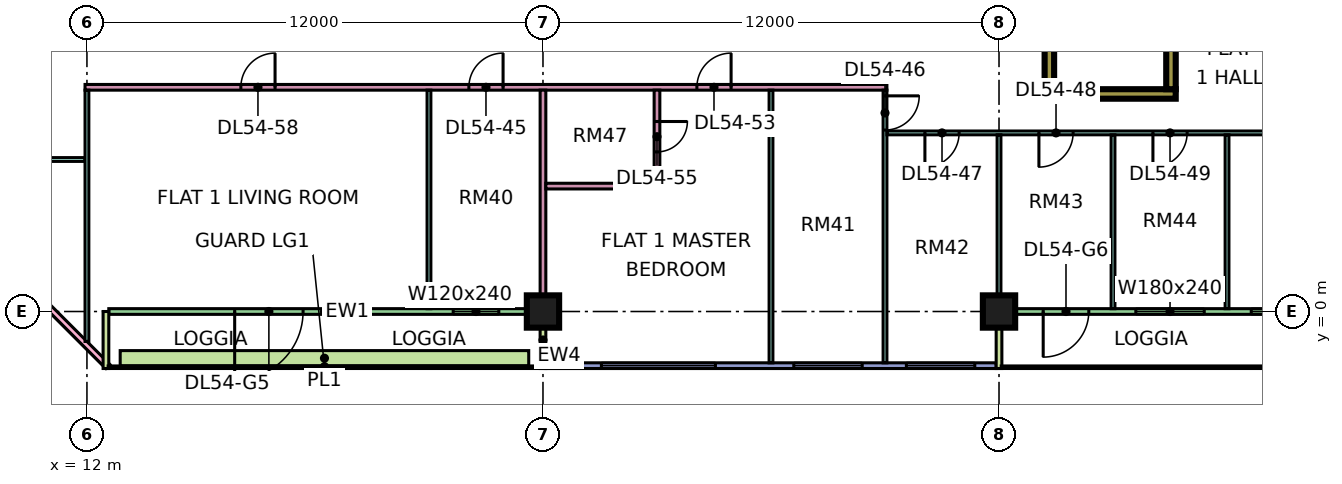
"""IFC4 building model, lengths in metres.
Left out: names, types, materials, properties, quantities, classifications, styles, units other than length and angle.
Written with IfcOpenShell. Run it as: python <this file> out.ifc"""

import sys

from ifc_helpers import new_model, si_unit, direction, frame, frame_2d, origin, origin_2d, place, context, subcontext, project, spatial, rectangle, extrude, element, fill, save


model = new_model("IFC4")
c1 = context("Model", 3, precision=1e-05, world=origin(), true_north=direction((0.0, 1.0)))
c2 = subcontext(c1, "Body", "Model", "MODEL_VIEW")
j1 = project(units=[si_unit("LENGTHUNIT", "METRE"), si_unit("PLANEANGLEUNIT", "RADIAN")], contexts=[c1])
p1 = place(None, origin())
s1 = spatial("IfcSite", under=j1, at=p1, CompositionType="ELEMENT")
p2 = place(p1, origin())
s2 = spatial("IfcBuilding", under=s1, at=p2, CompositionType="ELEMENT")
p3 = place(p2, frame((0.0, 0.0, 230.4)))
s3 = spatial("IfcBuildingStorey", under=s2, at=p3, CompositionType="ELEMENT", Elevation=230.4)
for number, where, z_axis, x_axis in (
    (1, (24.0, 0.0, 0.0), (0.0, 0.0, 1.0), (1.0, 0.0, 0.0)),
    (2, (36.0, 0.0, 0.0), (0.0, 0.0, 1.0), (1.0, 0.0, 0.0)),
):
    element("IfcColumn", number, at=place(p3, frame(where, z_axis=z_axis, x_axis=x_axis)), inside=s3, PredefinedType="COLUMN", context=c2, shape_type="SweptSolid", body=[
        extrude(rectangle(XDim=0.85, YDim=0.85, at=origin_2d()), origin(), (0.0, 0.0, 1.0), 3.75),
    ])
p4 = place(p3, frame((37.2, 5.725, 0.0), z_axis=(0.0, 0.0, 1.0), x_axis=(1.0, 0.0, 0.0)))
e3 = element("IfcWall", 3, at=p4, inside=s3, PredefinedType="SHEAR", context=c2, shape_type="SweptSolid", body=[
    extrude(rectangle(XDim=3.45, YDim=0.25, at=frame_2d((1.725, 0.0))), origin(), (0.0, 0.0, 1.0), 3.75),
])
for number, where, z_axis, x_axis in (
    (4, (37.325, 5.85, 0.0), (0.0, 0.0, 1.0), (0.0, 1.0, 0.0)),
    (5, (40.525, 5.85, 0.0), (0.0, 0.0, 1.0), (0.0, 1.0, 0.0)),
):
    element("IfcWall", number, at=place(p3, frame(where, z_axis=z_axis, x_axis=x_axis)), inside=s3, PredefinedType="SHEAR", context=c2, shape_type="SweptSolid", body=[
        extrude(rectangle(XDim=6.5, YDim=0.25, at=frame_2d((3.25, 0.0))), origin(), (0.0, 0.0, 1.0), 3.75),
    ])
p5 = place(p3, frame((-1.447, 12.553, 0.0), z_axis=(0.0, 0.0, 1.0), x_axis=(0.707106781187, -0.707106781187, 0.0)))
e6 = element("IfcWall", 6, at=p5, inside=s3, PredefinedType="SOLIDWALL", context=c2, shape_type="SweptSolid", body=[
    extrude(rectangle(XDim=19.799, YDim=0.15, at=frame_2d((9.899, 0.0))), origin(), (0.0, 0.0, 1.0), 3.35),
])
p6 = place(p5, frame((2.212, 0.0, 0.45)))
e7 = element("IfcOpeningElement", 7, at=p6, cuts=e6, PredefinedType="OPENING", context=c2, shape_type="SweptSolid", body=[
    extrude(rectangle(XDim=3.0, YDim=2.4, at=frame_2d((1.5, 1.2))), frame((0.0, 0.085, 0.0), z_axis=(0.0, -1.0, 0.0), x_axis=(1.0, 0.0, 0.0)), (0.0, 0.0, 1.0), 0.17),
])
p7 = place(p5, frame((10.216, 0.0, 0.45)))
e8 = element("IfcOpeningElement", 8, at=p7, cuts=e6, PredefinedType="OPENING", context=c2, shape_type="SweptSolid", body=[
    extrude(rectangle(XDim=3.0, YDim=2.4, at=frame_2d((1.5, 1.2))), frame((0.0, 0.085, 0.0), z_axis=(0.0, -1.0, 0.0), x_axis=(1.0, 0.0, 0.0)), (0.0, 0.0, 1.0), 0.17),
])
p8 = place(p3, frame((12.575, 0.0, 0.0), z_axis=(0.0, 0.0, 1.0), x_axis=(1.0, 0.0, 0.0)))
e9 = element("IfcWall", 9, at=p8, inside=s3, PredefinedType="SOLIDWALL", context=c2, shape_type="SweptSolid", body=[
    extrude(rectangle(XDim=11.35, YDim=0.15, at=frame_2d((5.675, 0.0))), origin(), (0.0, 0.0, 1.0), 3.35),
])
p9 = place(p8, frame((3.312, 0.0, 0.0)))
e10 = element("IfcOpeningElement", 10, at=p9, cuts=e9, PredefinedType="OPENING", context=c2, shape_type="SweptSolid", body=[
    extrude(rectangle(XDim=1.8, YDim=2.4, at=frame_2d((0.9, 1.2))), frame((0.0, 0.085, 0.0), z_axis=(0.0, -1.0, 0.0), x_axis=(1.0, 0.0, 0.0)), (0.0, 0.0, 1.0), 0.17),
])
p10 = place(p8, frame((9.062, 0.0, 0.45)))
e11 = element("IfcOpeningElement", 11, at=p10, cuts=e9, PredefinedType="OPENING", context=c2, shape_type="SweptSolid", body=[
    extrude(rectangle(XDim=1.2, YDim=2.4, at=frame_2d((0.6, 1.2))), frame((0.0, 0.085, 0.0), z_axis=(0.0, -1.0, 0.0), x_axis=(1.0, 0.0, 0.0)), (0.0, 0.0, 1.0), 0.17),
])
for number, where, z_axis, x_axis in (
    (12, (12.5, -1.5, 0.0), (0.0, 0.0, 1.0), (0.0, 1.0, 0.0)),
    (13, (24.0, -1.5, 0.0), (0.0, 0.0, 1.0), (0.0, 1.0, 0.0)),
):
    element("IfcWall", number, at=place(p3, frame(where, z_axis=z_axis, x_axis=x_axis)), inside=s3, PredefinedType="SOLIDWALL", context=c2, shape_type="SweptSolid", body=[
        extrude(rectangle(XDim=1.5, YDim=0.15, at=frame_2d((0.75, 0.0))), origin(), (0.0, 0.0, 1.0), 3.35),
    ])
p11 = place(p3, frame((24.075, -1.425, 0.0), z_axis=(0.0, 0.0, 1.0), x_axis=(1.0, 0.0, 0.0)))
e14 = element("IfcWall", 14, at=p11, inside=s3, PredefinedType="SOLIDWALL", context=c2, shape_type="SweptSolid", body=[
    extrude(rectangle(XDim=11.85, YDim=0.15, at=frame_2d((5.925, 0.0))), origin(), (0.0, 0.0, 1.0), 3.35),
])
p12 = place(p11, frame((1.462, 0.0, 0.45)))
e15 = element("IfcOpeningElement", 15, at=p12, cuts=e14, PredefinedType="OPENING", context=c2, shape_type="SweptSolid", body=[
    extrude(rectangle(XDim=3.0, YDim=2.4, at=frame_2d((1.5, 1.2))), frame((0.0, 0.085, 0.0), z_axis=(0.0, -1.0, 0.0), x_axis=(1.0, 0.0, 0.0)), (0.0, 0.0, 1.0), 0.17),
])
p13 = place(p11, frame((6.525, 0.0, 0.45)))
e16 = element("IfcOpeningElement", 16, at=p13, cuts=e14, PredefinedType="OPENING", context=c2, shape_type="SweptSolid", body=[
    extrude(rectangle(XDim=1.8, YDim=2.4, at=frame_2d((0.9, 1.2))), frame((0.0, 0.085, 0.0), z_axis=(0.0, -1.0, 0.0), x_axis=(1.0, 0.0, 0.0)), (0.0, 0.0, 1.0), 0.17),
])
p14 = place(p11, frame((9.488, 0.0, 0.45)))
e17 = element("IfcOpeningElement", 17, at=p14, cuts=e14, PredefinedType="OPENING", context=c2, shape_type="SweptSolid", body=[
    extrude(rectangle(XDim=1.8, YDim=2.4, at=frame_2d((0.9, 1.2))), frame((0.0, 0.085, 0.0), z_axis=(0.0, -1.0, 0.0), x_axis=(1.0, 0.0, 0.0)), (0.0, 0.0, 1.0), 0.17),
])
p15 = place(p3, frame((36.075, 0.0, 0.0), z_axis=(0.0, 0.0, 1.0), x_axis=(1.0, 0.0, 0.0)))
e18 = element("IfcWall", 18, at=p15, inside=s3, PredefinedType="SOLIDWALL", context=c2, shape_type="SweptSolid", body=[
    extrude(rectangle(XDim=11.85, YDim=0.15, at=frame_2d((5.925, 0.0))), origin(), (0.0, 0.0, 1.0), 3.35),
])
p16 = place(p15, frame((1.087, 0.0, 0.0)))
e19 = element("IfcOpeningElement", 19, at=p16, cuts=e18, PredefinedType="OPENING", context=c2, shape_type="SweptSolid", body=[
    extrude(rectangle(XDim=1.2, YDim=2.4, at=frame_2d((0.6, 1.2))), frame((0.0, 0.085, 0.0), z_axis=(0.0, -1.0, 0.0), x_axis=(1.0, 0.0, 0.0)), (0.0, 0.0, 1.0), 0.17),
])
p17 = place(p15, frame((3.525, 0.0, 0.45)))
e20 = element("IfcOpeningElement", 20, at=p17, cuts=e18, PredefinedType="OPENING", context=c2, shape_type="SweptSolid", body=[
    extrude(rectangle(XDim=1.8, YDim=2.4, at=frame_2d((0.9, 1.2))), frame((0.0, 0.085, 0.0), z_axis=(0.0, -1.0, 0.0), x_axis=(1.0, 0.0, 0.0)), (0.0, 0.0, 1.0), 0.17),
])
p18 = place(p15, frame((6.562, 0.0, 0.45)))
e21 = element("IfcOpeningElement", 21, at=p18, cuts=e18, PredefinedType="OPENING", context=c2, shape_type="SweptSolid", body=[
    extrude(rectangle(XDim=1.2, YDim=2.4, at=frame_2d((0.6, 1.2))), frame((0.0, 0.085, 0.0), z_axis=(0.0, -1.0, 0.0), x_axis=(1.0, 0.0, 0.0)), (0.0, 0.0, 1.0), 0.17),
])
p19 = place(p15, frame((10.05, 0.0, 0.45)))
e22 = element("IfcOpeningElement", 22, at=p19, cuts=e18, PredefinedType="OPENING", context=c2, shape_type="SweptSolid", body=[
    extrude(rectangle(XDim=1.2, YDim=2.4, at=frame_2d((0.6, 1.2))), frame((0.0, 0.085, 0.0), z_axis=(0.0, -1.0, 0.0), x_axis=(1.0, 0.0, 0.0)), (0.0, 0.0, 1.0), 0.17),
])
p20 = place(p3, frame((36.0, -1.5, 0.0), z_axis=(0.0, 0.0, 1.0), x_axis=(0.0, 1.0, 0.0)))
e23 = element("IfcWall", 23, at=p20, inside=s3, PredefinedType="SOLIDWALL", context=c2, shape_type="SweptSolid", body=[
    extrude(rectangle(XDim=1.5, YDim=0.15, at=frame_2d((0.75, 0.0))), origin(), (0.0, 0.0, 1.0), 3.35),
])
p21 = place(p3, frame((12.875, -1.229, 0.0), z_axis=(0.0, 0.0, 1.0), x_axis=(1.0, 0.0, 0.0)))
e24 = element("IfcWall", 24, at=p21, inside=s3, PredefinedType="SOLIDWALL", context=c2, shape_type="SweptSolid", body=[
    extrude(rectangle(XDim=10.75, YDim=0.4, at=frame_2d((5.375, 0.0))), origin(), (0.0, 0.0, 1.0), 0.7),
])
p22 = place(p3, frame((9.05, 4.0, 0.0), z_axis=(0.0, 0.0, 1.0), x_axis=(1.0, 0.0, 0.0)))
e25 = element("IfcWall", 25, at=p22, inside=s3, PredefinedType="PARTITIONING", context=c2, shape_type="SweptSolid", body=[
    extrude(rectangle(XDim=2.9, YDim=0.1, at=frame_2d((1.45, 0.0))), origin(), (0.0, 0.0, 1.0), 3.35),
])
p23 = place(p3, frame((11.95, 5.9, 0.0), z_axis=(0.0, 0.0, 1.0), x_axis=(1.0, 0.0, 0.0)))
e26 = element("IfcWall", 26, at=p23, inside=s3, PredefinedType="PARTITIONING", context=c2, shape_type="SweptSolid", body=[
    extrude(rectangle(XDim=21.1, YDim=0.15, at=frame_2d((10.55, 0.0))), origin(), (0.0, 0.0, 1.0), 3.35),
])
p24 = place(p23, frame((10.1, 0.0, 0.0)))
e27 = element("IfcOpeningElement", 27, at=p24, cuts=e26, PredefinedType="OPENING", context=c2, shape_type="SweptSolid", body=[
    extrude(rectangle(XDim=0.9, YDim=2.1, at=frame_2d((0.45, 1.05))), frame((0.0, 0.085, 0.0), z_axis=(0.0, -1.0, 0.0), x_axis=(1.0, 0.0, 0.0)), (0.0, 0.0, 1.0), 0.17),
])
p25 = place(p23, frame((16.1, 0.0, 0.0)))
e28 = element("IfcOpeningElement", 28, at=p25, cuts=e26, PredefinedType="OPENING", context=c2, shape_type="SweptSolid", body=[
    extrude(rectangle(XDim=0.9, YDim=2.1, at=frame_2d((0.45, 1.05))), frame((0.0, 0.085, 0.0), z_axis=(0.0, -1.0, 0.0), x_axis=(1.0, 0.0, 0.0)), (0.0, 0.0, 1.0), 0.17),
])
p26 = place(p23, frame((4.1, 0.0, 0.0)))
e29 = element("IfcOpeningElement", 29, at=p26, cuts=e26, PredefinedType="OPENING", context=c2, shape_type="SweptSolid", body=[
    extrude(rectangle(XDim=0.9, YDim=2.1, at=frame_2d((0.45, 1.05))), frame((0.0, 0.085, 0.0), z_axis=(0.0, -1.0, 0.0), x_axis=(1.0, 0.0, 0.0)), (0.0, 0.0, 1.0), 0.17),
])
p27 = place(p3, frame((12.0, -0.788, 0.0), z_axis=(0.0, 0.0, 1.0), x_axis=(0.0, 1.0, 0.0)))
e30 = element("IfcWall", 30, at=p27, inside=s3, PredefinedType="PARTITIONING", context=c2, shape_type="SweptSolid", body=[
    extrude(rectangle(XDim=6.613, YDim=0.1, at=frame_2d((3.306, 0.0))), origin(), (0.0, 0.0, 1.0), 3.35),
])
p28 = place(p3, frame((21.0, 0.074, 0.0), z_axis=(0.0, 0.0, 1.0), x_axis=(0.0, 1.0, 0.0)))
e31 = element("IfcWall", 31, at=p28, inside=s3, PredefinedType="PARTITIONING", context=c2, shape_type="SweptSolid", body=[
    extrude(rectangle(XDim=5.751, YDim=0.1, at=frame_2d((2.875, 0.0))), origin(), (0.0, 0.0, 1.0), 3.35),
])
p29 = place(p3, frame((24.0, 0.0, 0.0), z_axis=(0.0, 0.0, 1.0), x_axis=(0.0, 1.0, 0.0)))
e32 = element("IfcWall", 32, at=p29, inside=s3, PredefinedType="PARTITIONING", context=c2, shape_type="SweptSolid", body=[
    extrude(rectangle(XDim=5.825, YDim=0.15, at=frame_2d((2.913, 0.0))), origin(), (0.0, 0.0, 1.0), 3.35),
])
p30 = place(p3, frame((24.075, 3.3, 0.0), z_axis=(0.0, 0.0, 1.0), x_axis=(1.0, 0.0, 0.0)))
e33 = element("IfcWall", 33, at=p30, inside=s3, PredefinedType="PARTITIONING", context=c2, shape_type="SweptSolid", body=[
    extrude(rectangle(XDim=3.0, YDim=0.15, at=frame_2d((1.5, 0.0))), origin(), (0.0, 0.0, 1.0), 3.35),
])
p31 = place(p3, frame((27.0, 3.375, 0.0), z_axis=(0.0, 0.0, 1.0), x_axis=(0.0, 1.0, 0.0)))
e34 = element("IfcWall", 34, at=p31, inside=s3, PredefinedType="PARTITIONING", context=c2, shape_type="SweptSolid", body=[
    extrude(rectangle(XDim=2.45, YDim=0.15, at=frame_2d((1.225, 0.0))), origin(), (0.0, 0.0, 1.0), 3.35),
])
p32 = place(p31, frame((0.825, 0.0, 0.0)))
e35 = element("IfcOpeningElement", 35, at=p32, cuts=e34, PredefinedType="OPENING", context=c2, shape_type="SweptSolid", body=[
    extrude(rectangle(XDim=0.8, YDim=2.1, at=frame_2d((0.4, 1.05))), frame((0.0, 0.085, 0.0), z_axis=(0.0, -1.0, 0.0), x_axis=(1.0, 0.0, 0.0)), (0.0, 0.0, 1.0), 0.17),
])
p33 = place(p3, frame((30.0, -1.351, 0.0), z_axis=(0.0, 0.0, 1.0), x_axis=(0.0, 1.0, 0.0)))
e36 = element("IfcWall", 36, at=p33, inside=s3, PredefinedType="PARTITIONING", context=c2, shape_type="SweptSolid", body=[
    extrude(rectangle(XDim=7.176, YDim=0.1, at=frame_2d((3.588, 0.0))), origin(), (0.0, 0.0, 1.0), 3.35),
])
p34 = place(p3, frame((33.0, -1.351, 0.0), z_axis=(0.0, 0.0, 1.0), x_axis=(0.0, 1.0, 0.0)))
e37 = element("IfcWall", 37, at=p34, inside=s3, PredefinedType="PARTITIONING", context=c2, shape_type="SweptSolid", body=[
    extrude(rectangle(XDim=7.176, YDim=0.1, at=frame_2d((3.588, 0.0))), origin(), (0.0, 0.0, 1.0), 3.35),
])
p35 = place(p34, frame((6.126, 0.0, 0.0)))
e38 = element("IfcOpeningElement", 38, at=p35, cuts=e37, PredefinedType="OPENING", context=c2, shape_type="SweptSolid", body=[
    extrude(rectangle(XDim=0.9, YDim=2.1, at=frame_2d((0.45, 1.05))), frame((0.0, 0.06, 0.0), z_axis=(0.0, -1.0, 0.0), x_axis=(1.0, 0.0, 0.0)), (0.0, 0.0, 1.0), 0.12),
])
p36 = place(p3, frame((33.05, 4.7, 0.0), z_axis=(0.0, 0.0, 1.0), x_axis=(1.0, 0.0, 0.0)))
e39 = element("IfcWall", 39, at=p36, inside=s3, PredefinedType="PARTITIONING", context=c2, shape_type="SweptSolid", body=[
    extrude(rectangle(XDim=20.85, YDim=0.1, at=frame_2d((10.425, 0.0))), origin(), (0.0, 0.0, 1.0), 3.35),
])
p37 = place(p36, frame((1.0, 0.0, 0.0)))
e40 = element("IfcOpeningElement", 40, at=p37, cuts=e39, PredefinedType="OPENING", context=c2, shape_type="SweptSolid", body=[
    extrude(rectangle(XDim=0.9, YDim=2.1, at=frame_2d((0.45, 1.05))), frame((0.0, 0.06, 0.0), z_axis=(0.0, -1.0, 0.0), x_axis=(1.0, 0.0, 0.0)), (0.0, 0.0, 1.0), 0.12),
])
p38 = place(p36, frame((4.0, 0.0, 0.0)))
e41 = element("IfcOpeningElement", 41, at=p38, cuts=e39, PredefinedType="OPENING", context=c2, shape_type="SweptSolid", body=[
    extrude(rectangle(XDim=0.9, YDim=2.1, at=frame_2d((0.45, 1.05))), frame((0.0, 0.06, 0.0), z_axis=(0.0, -1.0, 0.0), x_axis=(1.0, 0.0, 0.0)), (0.0, 0.0, 1.0), 0.12),
])
p39 = place(p36, frame((7.0, 0.0, 0.0)))
e42 = element("IfcOpeningElement", 42, at=p39, cuts=e39, PredefinedType="OPENING", context=c2, shape_type="SweptSolid", body=[
    extrude(rectangle(XDim=0.9, YDim=2.1, at=frame_2d((0.45, 1.05))), frame((0.0, 0.06, 0.0), z_axis=(0.0, -1.0, 0.0), x_axis=(1.0, 0.0, 0.0)), (0.0, 0.0, 1.0), 0.12),
])
p40 = place(p36, frame((19.0, 0.0, 0.0)))
e43 = element("IfcOpeningElement", 43, at=p40, cuts=e39, PredefinedType="OPENING", context=c2, shape_type="SweptSolid", body=[
    extrude(rectangle(XDim=0.9, YDim=2.1, at=frame_2d((0.45, 1.05))), frame((0.0, 0.06, 0.0), z_axis=(0.0, -1.0, 0.0), x_axis=(1.0, 0.0, 0.0)), (0.0, 0.0, 1.0), 0.12),
])
p41 = place(p36, frame((13.0, 0.0, 0.0)))
e44 = element("IfcOpeningElement", 44, at=p41, cuts=e39, PredefinedType="OPENING", context=c2, shape_type="SweptSolid", body=[
    extrude(rectangle(XDim=0.9, YDim=2.1, at=frame_2d((0.45, 1.05))), frame((0.0, 0.06, 0.0), z_axis=(0.0, -1.0, 0.0), x_axis=(1.0, 0.0, 0.0)), (0.0, 0.0, 1.0), 0.12),
])
p42 = place(p3, frame((36.0, 0.0, 0.0), z_axis=(0.0, 0.0, 1.0), x_axis=(0.0, 1.0, 0.0)))
e45 = element("IfcWall", 45, at=p42, inside=s3, PredefinedType="PARTITIONING", context=c2, shape_type="SweptSolid", body=[
    extrude(rectangle(XDim=4.65, YDim=0.1, at=frame_2d((2.325, 0.0))), origin(), (0.0, 0.0, 1.0), 3.35),
])
for number, where, z_axis, x_axis in (
    (46, (39.0, 0.074, 0.0), (0.0, 0.0, 1.0), (0.0, 1.0, 0.0)),
    (47, (42.0, 0.074, 0.0), (0.0, 0.0, 1.0), (0.0, 1.0, 0.0)),
):
    element("IfcWall", number, at=place(p3, frame(where, z_axis=z_axis, x_axis=x_axis)), inside=s3, PredefinedType="PARTITIONING", context=c2, shape_type="SweptSolid", body=[
        extrude(rectangle(XDim=4.576, YDim=0.1, at=frame_2d((2.288, 0.0))), origin(), (0.0, 0.0, 1.0), 3.35),
    ])
p43 = place(p9, frame((1.8, 0.0, 0.0), z_axis=(0.0, 0.0, 1.0), x_axis=(-1.0, 0.0, 0.0)))
e48 = element("IfcDoor", 48, at=p43, inside=s3, OperationType="DOUBLE_DOOR_SINGLE_SWING", PredefinedType="DOOR", context=c2, shape_type="SweptSolid", body=[
    extrude(rectangle(XDim=1.8, YDim=2.4, at=frame_2d((0.9, 1.2))), frame((0.0, 0.025, 0.0), z_axis=(0.0, -1.0, 0.0), x_axis=(1.0, 0.0, 0.0)), (0.0, 0.0, 1.0), 0.05),
])
fill(e10, e48)
p44 = place(p10, origin())
e49 = element("IfcWindow", 49, at=p44, inside=s3, PartitioningType="SINGLE_PANEL", PredefinedType="WINDOW", context=c2, shape_type="SweptSolid", body=[
    extrude(rectangle(XDim=1.2, YDim=2.4, at=frame_2d((0.6, 1.2))), frame((0.0, 0.03, 0.0), z_axis=(0.0, -1.0, 0.0), x_axis=(1.0, 0.0, 0.0)), (0.0, 0.0, 1.0), 0.06),
])
fill(e11, e49)
p45 = place(p12, origin())
e50 = element("IfcWindow", 50, at=p45, inside=s3, PartitioningType="SINGLE_PANEL", PredefinedType="WINDOW", context=c2, shape_type="SweptSolid", body=[
    extrude(rectangle(XDim=3.0, YDim=2.4, at=frame_2d((1.5, 1.2))), frame((0.0, 0.03, 0.0), z_axis=(0.0, -1.0, 0.0), x_axis=(1.0, 0.0, 0.0)), (0.0, 0.0, 1.0), 0.06),
])
fill(e15, e50)
p46 = place(p13, origin())
e51 = element("IfcWindow", 51, at=p46, inside=s3, PartitioningType="SINGLE_PANEL", PredefinedType="WINDOW", context=c2, shape_type="SweptSolid", body=[
    extrude(rectangle(XDim=1.8, YDim=2.4, at=frame_2d((0.9, 1.2))), frame((0.0, 0.03, 0.0), z_axis=(0.0, -1.0, 0.0), x_axis=(1.0, 0.0, 0.0)), (0.0, 0.0, 1.0), 0.06),
])
fill(e16, e51)
p47 = place(p14, origin())
e52 = element("IfcWindow", 52, at=p47, inside=s3, PartitioningType="SINGLE_PANEL", PredefinedType="WINDOW", context=c2, shape_type="SweptSolid", body=[
    extrude(rectangle(XDim=1.8, YDim=2.4, at=frame_2d((0.9, 1.2))), frame((0.0, 0.03, 0.0), z_axis=(0.0, -1.0, 0.0), x_axis=(1.0, 0.0, 0.0)), (0.0, 0.0, 1.0), 0.06),
])
fill(e17, e52)
p48 = place(p16, frame((1.2, 0.0, 0.0), z_axis=(0.0, 0.0, 1.0), x_axis=(-1.0, 0.0, 0.0)))
e53 = element("IfcDoor", 53, at=p48, inside=s3, OperationType="DOUBLE_DOOR_SINGLE_SWING", PredefinedType="DOOR", context=c2, shape_type="SweptSolid", body=[
    extrude(rectangle(XDim=1.2, YDim=2.4, at=frame_2d((0.6, 1.2))), frame((0.0, 0.025, 0.0), z_axis=(0.0, -1.0, 0.0), x_axis=(1.0, 0.0, 0.0)), (0.0, 0.0, 1.0), 0.05),
])
fill(e19, e53)
p49 = place(p17, origin())
e54 = element("IfcWindow", 54, at=p49, inside=s3, PartitioningType="SINGLE_PANEL", PredefinedType="WINDOW", context=c2, shape_type="SweptSolid", body=[
    extrude(rectangle(XDim=1.8, YDim=2.4, at=frame_2d((0.9, 1.2))), frame((0.0, 0.03, 0.0), z_axis=(0.0, -1.0, 0.0), x_axis=(1.0, 0.0, 0.0)), (0.0, 0.0, 1.0), 0.06),
])
fill(e20, e54)
p50 = place(p18, origin())
e55 = element("IfcWindow", 55, at=p50, inside=s3, PartitioningType="SINGLE_PANEL", PredefinedType="WINDOW", context=c2, shape_type="SweptSolid", body=[
    extrude(rectangle(XDim=1.2, YDim=2.4, at=frame_2d((0.6, 1.2))), frame((0.0, 0.03, 0.0), z_axis=(0.0, -1.0, 0.0), x_axis=(1.0, 0.0, 0.0)), (0.0, 0.0, 1.0), 0.06),
])
fill(e21, e55)
p51 = place(p24, frame((0.9, 0.0, 0.0), z_axis=(0.0, 0.0, 1.0), x_axis=(-1.0, 0.0, 0.0)))
e56 = element("IfcDoor", 56, at=p51, inside=s3, OperationType="SINGLE_SWING_RIGHT", PredefinedType="DOOR", context=c2, shape_type="SweptSolid", body=[
    extrude(rectangle(XDim=0.9, YDim=2.1, at=frame_2d((0.45, 1.05))), frame((0.0, 0.025, 0.0), z_axis=(0.0, -1.0, 0.0), x_axis=(1.0, 0.0, 0.0)), (0.0, 0.0, 1.0), 0.05),
])
fill(e27, e56)
p52 = place(p35, origin())
e57 = element("IfcDoor", 57, at=p52, inside=s3, OperationType="SINGLE_SWING_RIGHT", PredefinedType="DOOR", context=c2, shape_type="SweptSolid", body=[
    extrude(rectangle(XDim=0.9, YDim=2.1, at=frame_2d((0.45, 1.05))), frame((0.0, 0.025, 0.0), z_axis=(0.0, -1.0, 0.0), x_axis=(1.0, 0.0, 0.0)), (0.0, 0.0, 1.0), 0.05),
])
fill(e38, e57)
p53 = place(p37, frame((0.9, 0.0, 0.0), z_axis=(0.0, 0.0, 1.0), x_axis=(-1.0, 0.0, 0.0)))
e58 = element("IfcDoor", 58, at=p53, inside=s3, OperationType="SINGLE_SWING_LEFT", PredefinedType="DOOR", context=c2, shape_type="SweptSolid", body=[
    extrude(rectangle(XDim=0.9, YDim=2.1, at=frame_2d((0.45, 1.05))), frame((0.0, 0.025, 0.0), z_axis=(0.0, -1.0, 0.0), x_axis=(1.0, 0.0, 0.0)), (0.0, 0.0, 1.0), 0.05),
])
fill(e40, e58)
p54 = place(p38, frame((0.9, 0.0, 0.0), z_axis=(0.0, 0.0, 1.0), x_axis=(-1.0, 0.0, 0.0)))
e59 = element("IfcDoor", 59, at=p54, inside=s3, OperationType="SINGLE_SWING_LEFT", PredefinedType="DOOR", context=c2, shape_type="SweptSolid", body=[
    extrude(rectangle(XDim=0.9, YDim=2.1, at=frame_2d((0.45, 1.05))), frame((0.0, 0.025, 0.0), z_axis=(0.0, -1.0, 0.0), x_axis=(1.0, 0.0, 0.0)), (0.0, 0.0, 1.0), 0.05),
])
fill(e41, e59)
p55 = place(p39, frame((0.9, 0.0, 0.0), z_axis=(0.0, 0.0, 1.0), x_axis=(-1.0, 0.0, 0.0)))
e60 = element("IfcDoor", 60, at=p55, inside=s3, OperationType="SINGLE_SWING_LEFT", PredefinedType="DOOR", context=c2, shape_type="SweptSolid", body=[
    extrude(rectangle(XDim=0.9, YDim=2.1, at=frame_2d((0.45, 1.05))), frame((0.0, 0.025, 0.0), z_axis=(0.0, -1.0, 0.0), x_axis=(1.0, 0.0, 0.0)), (0.0, 0.0, 1.0), 0.05),
])
fill(e42, e60)
p56 = place(p25, frame((0.9, 0.0, 0.0), z_axis=(0.0, 0.0, 1.0), x_axis=(-1.0, 0.0, 0.0)))
e61 = element("IfcDoor", 61, at=p56, inside=s3, OperationType="SINGLE_SWING_RIGHT", PredefinedType="DOOR", context=c2, shape_type="SweptSolid", body=[
    extrude(rectangle(XDim=0.9, YDim=2.1, at=frame_2d((0.45, 1.05))), frame((0.0, 0.025, 0.0), z_axis=(0.0, -1.0, 0.0), x_axis=(1.0, 0.0, 0.0)), (0.0, 0.0, 1.0), 0.05),
])
fill(e28, e61)
p57 = place(p32, origin())
e62 = element("IfcDoor", 62, at=p57, inside=s3, OperationType="SINGLE_SWING_RIGHT", PredefinedType="DOOR", context=c2, shape_type="SweptSolid", body=[
    extrude(rectangle(XDim=0.8, YDim=2.1, at=frame_2d((0.4, 1.05))), frame((0.0, 0.025, 0.0), z_axis=(0.0, -1.0, 0.0), x_axis=(1.0, 0.0, 0.0)), (0.0, 0.0, 1.0), 0.05),
])
fill(e35, e62)
p58 = place(p26, frame((0.9, 0.0, 0.0), z_axis=(0.0, 0.0, 1.0), x_axis=(-1.0, 0.0, 0.0)))
e63 = element("IfcDoor", 63, at=p58, inside=s3, OperationType="SINGLE_SWING_RIGHT", PredefinedType="DOOR", context=c2, shape_type="SweptSolid", body=[
    extrude(rectangle(XDim=0.9, YDim=2.1, at=frame_2d((0.45, 1.05))), frame((0.0, 0.025, 0.0), z_axis=(0.0, -1.0, 0.0), x_axis=(1.0, 0.0, 0.0)), (0.0, 0.0, 1.0), 0.05),
])
fill(e29, e63)
save(model, sys.argv[1])
